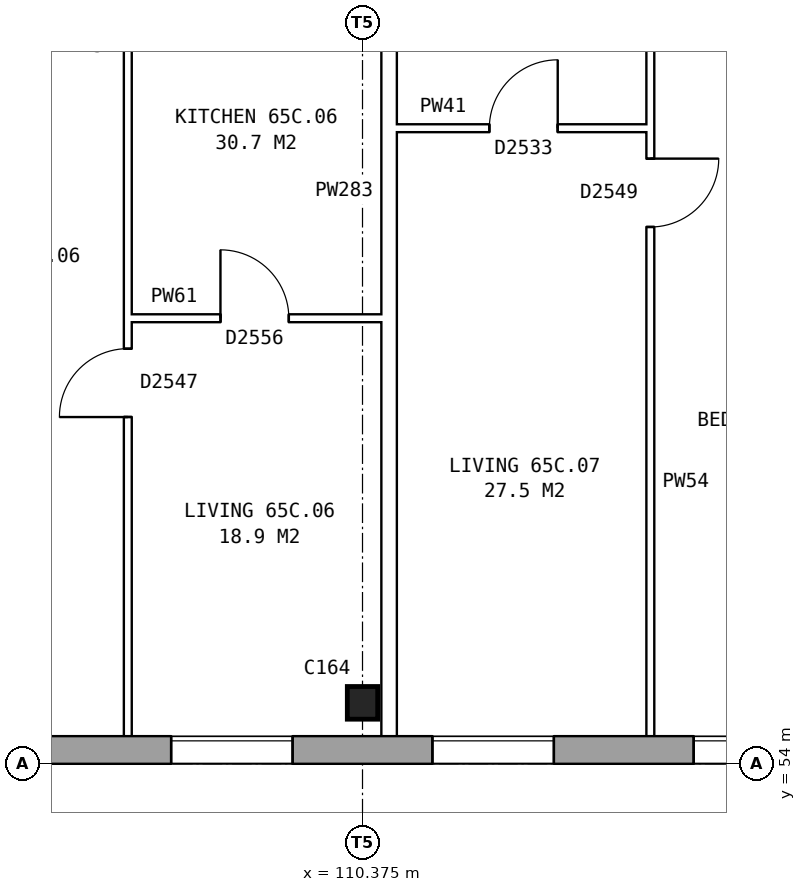
"""IFC4 building model, lengths in metres.
Left out: names, types, materials, properties, quantities, classifications, styles, units other than length and angle.
Written with IfcOpenShell. Run it as: python <this file> out.ifc"""

import sys

from ifc_helpers import new_model, si_unit, direction, frame, frame_2d, origin, origin_2d, place, context, subcontext, project, spatial, rectangle, i_section, extrude, element, fill, save


model = new_model("IFC4")
c1 = context("Model", 3, precision=1e-05, world=origin(), true_north=direction((0.0, 1.0)))
c2 = subcontext(c1, "Body", "Model", "MODEL_VIEW")
j1 = project(units=[si_unit("LENGTHUNIT", "METRE"), si_unit("PLANEANGLEUNIT", "RADIAN")], contexts=[c1])
p1 = place(None, origin())
s1 = spatial("IfcSite", under=j1, at=p1, CompositionType="ELEMENT")
p2 = place(p1, origin())
s2 = spatial("IfcBuilding", under=s1, at=p2, CompositionType="ELEMENT")
p3 = place(p2, frame((0.0, 0.0, 230.7)))
s3 = spatial("IfcBuildingStorey", under=s2, at=p3, CompositionType="ELEMENT", Elevation=230.7)
p4 = place(p3, frame((110.375, 54.8, 0.0), z_axis=(0.0, 0.0, 1.0), x_axis=(1.0, 0.0, 0.0)))
e1 = element("IfcColumn", 1, at=p4, inside=s3, PredefinedType="COLUMN", context=c2, shape_type="SweptSolid", body=[
    extrude(i_section(OverallWidth=0.4, OverallDepth=0.43, WebThickness=0.028, FlangeThickness=0.04, at=origin_2d()), origin(), (0.0, 0.0, 1.0), 2.85),
])
p5 = place(p3, frame((75.95, 54.18, 0.0), z_axis=(0.0, 0.0, 1.0), x_axis=(1.0, 0.0, 0.0)))
e2 = element("IfcWall", 2, at=p5, inside=s3, PredefinedType="STANDARD", context=c2, shape_type="SweptSolid", body=[
    extrude(rectangle(XDim=55.1, YDim=0.36, at=frame_2d((27.55, 0.0))), origin(), (0.0, 0.0, 1.0), 2.85),
])
p6 = place(p5, frame((0.969, 0.0, 0.8)))
e3 = element("IfcOpeningElement", 3, at=p6, cuts=e2, PredefinedType="OPENING", context=c2, shape_type="SweptSolid", body=[
    extrude(rectangle(XDim=1.6, YDim=1.8, at=frame_2d((0.8, 0.9))), frame((0.0, 0.19, 0.0), z_axis=(0.0, -1.0, 0.0), x_axis=(1.0, 0.0, 0.0)), (0.0, 0.0, 1.0), 0.38),
])
p7 = place(p5, frame((4.406, 0.0, 0.8)))
e4 = element("IfcOpeningElement", 4, at=p7, cuts=e2, PredefinedType="OPENING", context=c2, shape_type="SweptSolid", body=[
    extrude(rectangle(XDim=1.6, YDim=1.8, at=frame_2d((0.8, 0.9))), frame((0.0, 0.19, 0.0), z_axis=(0.0, -1.0, 0.0), x_axis=(1.0, 0.0, 0.0)), (0.0, 0.0, 1.0), 0.38),
])
p8 = place(p5, frame((7.844, 0.0, 0.8)))
e5 = element("IfcOpeningElement", 5, at=p8, cuts=e2, PredefinedType="OPENING", context=c2, shape_type="SweptSolid", body=[
    extrude(rectangle(XDim=1.6, YDim=1.8, at=frame_2d((0.8, 0.9))), frame((0.0, 0.19, 0.0), z_axis=(0.0, -1.0, 0.0), x_axis=(1.0, 0.0, 0.0)), (0.0, 0.0, 1.0), 0.38),
])
p9 = place(p5, frame((11.281, 0.0, 0.8)))
e6 = element("IfcOpeningElement", 6, at=p9, cuts=e2, PredefinedType="OPENING", context=c2, shape_type="SweptSolid", body=[
    extrude(rectangle(XDim=1.6, YDim=1.8, at=frame_2d((0.8, 0.9))), frame((0.0, 0.19, 0.0), z_axis=(0.0, -1.0, 0.0), x_axis=(1.0, 0.0, 0.0)), (0.0, 0.0, 1.0), 0.38),
])
p10 = place(p5, frame((14.719, 0.0, 0.8)))
e7 = element("IfcOpeningElement", 7, at=p10, cuts=e2, PredefinedType="OPENING", context=c2, shape_type="SweptSolid", body=[
    extrude(rectangle(XDim=1.6, YDim=1.8, at=frame_2d((0.8, 0.9))), frame((0.0, 0.19, 0.0), z_axis=(0.0, -1.0, 0.0), x_axis=(1.0, 0.0, 0.0)), (0.0, 0.0, 1.0), 0.38),
])
p11 = place(p5, frame((18.156, 0.0, 0.8)))
e8 = element("IfcOpeningElement", 8, at=p11, cuts=e2, PredefinedType="OPENING", context=c2, shape_type="SweptSolid", body=[
    extrude(rectangle(XDim=1.6, YDim=1.8, at=frame_2d((0.8, 0.9))), frame((0.0, 0.19, 0.0), z_axis=(0.0, -1.0, 0.0), x_axis=(1.0, 0.0, 0.0)), (0.0, 0.0, 1.0), 0.38),
])
p12 = place(p5, frame((21.594, 0.0, 0.8)))
e9 = element("IfcOpeningElement", 9, at=p12, cuts=e2, PredefinedType="OPENING", context=c2, shape_type="SweptSolid", body=[
    extrude(rectangle(XDim=1.6, YDim=1.8, at=frame_2d((0.8, 0.9))), frame((0.0, 0.19, 0.0), z_axis=(0.0, -1.0, 0.0), x_axis=(1.0, 0.0, 0.0)), (0.0, 0.0, 1.0), 0.38),
])
p13 = place(p5, frame((25.031, 0.0, 0.8)))
e10 = element("IfcOpeningElement", 10, at=p13, cuts=e2, PredefinedType="OPENING", context=c2, shape_type="SweptSolid", body=[
    extrude(rectangle(XDim=1.6, YDim=1.8, at=frame_2d((0.8, 0.9))), frame((0.0, 0.19, 0.0), z_axis=(0.0, -1.0, 0.0), x_axis=(1.0, 0.0, 0.0)), (0.0, 0.0, 1.0), 0.38),
])
p14 = place(p5, frame((28.469, 0.0, 0.8)))
e11 = element("IfcOpeningElement", 11, at=p14, cuts=e2, PredefinedType="OPENING", context=c2, shape_type="SweptSolid", body=[
    extrude(rectangle(XDim=1.6, YDim=1.8, at=frame_2d((0.8, 0.9))), frame((0.0, 0.19, 0.0), z_axis=(0.0, -1.0, 0.0), x_axis=(1.0, 0.0, 0.0)), (0.0, 0.0, 1.0), 0.38),
])
p15 = place(p5, frame((31.906, 0.0, 0.8)))
e12 = element("IfcOpeningElement", 12, at=p15, cuts=e2, PredefinedType="OPENING", context=c2, shape_type="SweptSolid", body=[
    extrude(rectangle(XDim=1.6, YDim=1.8, at=frame_2d((0.8, 0.9))), frame((0.0, 0.19, 0.0), z_axis=(0.0, -1.0, 0.0), x_axis=(1.0, 0.0, 0.0)), (0.0, 0.0, 1.0), 0.38),
])
p16 = place(p5, frame((35.344, 0.0, 0.8)))
e13 = element("IfcOpeningElement", 13, at=p16, cuts=e2, PredefinedType="OPENING", context=c2, shape_type="SweptSolid", body=[
    extrude(rectangle(XDim=1.6, YDim=1.8, at=frame_2d((0.8, 0.9))), frame((0.0, 0.19, 0.0), z_axis=(0.0, -1.0, 0.0), x_axis=(1.0, 0.0, 0.0)), (0.0, 0.0, 1.0), 0.38),
])
p17 = place(p5, frame((38.781, 0.0, 0.8)))
e14 = element("IfcOpeningElement", 14, at=p17, cuts=e2, PredefinedType="OPENING", context=c2, shape_type="SweptSolid", body=[
    extrude(rectangle(XDim=1.6, YDim=1.8, at=frame_2d((0.8, 0.9))), frame((0.0, 0.19, 0.0), z_axis=(0.0, -1.0, 0.0), x_axis=(1.0, 0.0, 0.0)), (0.0, 0.0, 1.0), 0.38),
])
p18 = place(p5, frame((42.219, 0.0, 0.8)))
e15 = element("IfcOpeningElement", 15, at=p18, cuts=e2, PredefinedType="OPENING", context=c2, shape_type="SweptSolid", body=[
    extrude(rectangle(XDim=1.6, YDim=1.8, at=frame_2d((0.8, 0.9))), frame((0.0, 0.19, 0.0), z_axis=(0.0, -1.0, 0.0), x_axis=(1.0, 0.0, 0.0)), (0.0, 0.0, 1.0), 0.38),
])
p19 = place(p5, frame((45.656, 0.0, 0.8)))
e16 = element("IfcOpeningElement", 16, at=p19, cuts=e2, PredefinedType="OPENING", context=c2, shape_type="SweptSolid", body=[
    extrude(rectangle(XDim=1.6, YDim=1.8, at=frame_2d((0.8, 0.9))), frame((0.0, 0.19, 0.0), z_axis=(0.0, -1.0, 0.0), x_axis=(1.0, 0.0, 0.0)), (0.0, 0.0, 1.0), 0.38),
])
p20 = place(p5, frame((49.094, 0.0, 0.8)))
e17 = element("IfcOpeningElement", 17, at=p20, cuts=e2, PredefinedType="OPENING", context=c2, shape_type="SweptSolid", body=[
    extrude(rectangle(XDim=1.6, YDim=1.8, at=frame_2d((0.8, 0.9))), frame((0.0, 0.19, 0.0), z_axis=(0.0, -1.0, 0.0), x_axis=(1.0, 0.0, 0.0)), (0.0, 0.0, 1.0), 0.38),
])
p21 = place(p5, frame((52.531, 0.0, 0.8)))
e18 = element("IfcOpeningElement", 18, at=p21, cuts=e2, PredefinedType="OPENING", context=c2, shape_type="SweptSolid", body=[
    extrude(rectangle(XDim=1.6, YDim=1.8, at=frame_2d((0.8, 0.9))), frame((0.0, 0.19, 0.0), z_axis=(0.0, -1.0, 0.0), x_axis=(1.0, 0.0, 0.0)), (0.0, 0.0, 1.0), 0.38),
])
p22 = place(p3, frame((107.287, 59.86, 0.0), z_axis=(0.0, 0.0, 1.0), x_axis=(1.0, 0.0, 0.0)))
e19 = element("IfcWall", 19, at=p22, inside=s3, PredefinedType="PARTITIONING", context=c2, shape_type="SweptSolid", body=[
    extrude(rectangle(XDim=3.338, YDim=0.1, at=frame_2d((1.669, 0.0))), origin(), (0.0, 0.0, 1.0), 2.85),
])
p23 = place(p22, frame((1.219, 0.0, 0.0)))
e20 = element("IfcOpeningElement", 20, at=p23, cuts=e19, PredefinedType="OPENING", context=c2, shape_type="SweptSolid", body=[
    extrude(rectangle(XDim=0.9, YDim=2.1, at=frame_2d((0.45, 1.05))), frame((0.0, 0.06, 0.0), z_axis=(0.0, -1.0, 0.0), x_axis=(1.0, 0.0, 0.0)), (0.0, 0.0, 1.0), 0.12),
])
p24 = place(p3, frame((110.825, 62.36, 0.0), z_axis=(0.0, 0.0, 1.0), x_axis=(1.0, 0.0, 0.0)))
e21 = element("IfcWall", 21, at=p24, inside=s3, PredefinedType="PARTITIONING", context=c2, shape_type="SweptSolid", body=[
    extrude(rectangle(XDim=3.337, YDim=0.1, at=frame_2d((1.668, 0.0))), origin(), (0.0, 0.0, 1.0), 2.85),
])
p25 = place(p24, frame((1.219, 0.0, 0.0)))
e22 = element("IfcOpeningElement", 22, at=p25, cuts=e21, PredefinedType="OPENING", context=c2, shape_type="SweptSolid", body=[
    extrude(rectangle(XDim=0.9, YDim=2.1, at=frame_2d((0.45, 1.05))), frame((0.0, 0.06, 0.0), z_axis=(0.0, -1.0, 0.0), x_axis=(1.0, 0.0, 0.0)), (0.0, 0.0, 1.0), 0.12),
])
p26 = place(p3, frame((107.287, 54.36, 0.0), z_axis=(0.0, 0.0, 1.0), x_axis=(0.0, 1.0, 0.0)))
e23 = element("IfcWall", 23, at=p26, inside=s3, PredefinedType="PARTITIONING", context=c2, shape_type="SweptSolid", body=[
    extrude(rectangle(XDim=14.34, YDim=0.1, at=frame_2d((7.17, 0.0))), origin(), (0.0, 0.0, 1.0), 2.85),
])
p27 = place(p26, frame((4.2, 0.0, 0.0)))
e24 = element("IfcOpeningElement", 24, at=p27, cuts=e23, PredefinedType="OPENING", context=c2, shape_type="SweptSolid", body=[
    extrude(rectangle(XDim=0.9, YDim=2.1, at=frame_2d((0.45, 1.05))), frame((0.0, 0.06, 0.0), z_axis=(0.0, -1.0, 0.0), x_axis=(1.0, 0.0, 0.0)), (0.0, 0.0, 1.0), 0.12),
])
p28 = place(p26, frame((13.04, 0.0, 0.0)))
e25 = element("IfcOpeningElement", 25, at=p28, cuts=e23, PredefinedType="OPENING", context=c2, shape_type="SweptSolid", body=[
    extrude(rectangle(XDim=0.9, YDim=2.1, at=frame_2d((0.45, 1.05))), frame((0.0, 0.06, 0.0), z_axis=(0.0, -1.0, 0.0), x_axis=(1.0, 0.0, 0.0)), (0.0, 0.0, 1.0), 0.12),
])
p29 = place(p3, frame((110.725, 54.36, 0.0), z_axis=(0.0, 0.0, 1.0), x_axis=(0.0, 1.0, 0.0)))
e26 = element("IfcWall", 26, at=p29, inside=s3, PredefinedType="PARTITIONING", context=c2, shape_type="SweptSolid", body=[
    extrude(rectangle(XDim=14.34, YDim=0.2, at=frame_2d((7.17, 0.0))), origin(), (0.0, 0.0, 1.0), 2.85),
])
p30 = place(p3, frame((114.162, 54.36, 0.0), z_axis=(0.0, 0.0, 1.0), x_axis=(0.0, 1.0, 0.0)))
e27 = element("IfcWall", 27, at=p30, inside=s3, PredefinedType="PARTITIONING", context=c2, shape_type="SweptSolid", body=[
    extrude(rectangle(XDim=14.34, YDim=0.1, at=frame_2d((7.17, 0.0))), origin(), (0.0, 0.0, 1.0), 2.85),
])
p31 = place(p30, frame((6.7, 0.0, 0.0)))
e28 = element("IfcOpeningElement", 28, at=p31, cuts=e27, PredefinedType="OPENING", context=c2, shape_type="SweptSolid", body=[
    extrude(rectangle(XDim=0.9, YDim=2.1, at=frame_2d((0.45, 1.05))), frame((0.0, 0.06, 0.0), z_axis=(0.0, -1.0, 0.0), x_axis=(1.0, 0.0, 0.0)), (0.0, 0.0, 1.0), 0.12),
])
p32 = place(p30, frame((13.04, 0.0, 0.0)))
e29 = element("IfcOpeningElement", 29, at=p32, cuts=e27, PredefinedType="OPENING", context=c2, shape_type="SweptSolid", body=[
    extrude(rectangle(XDim=0.9, YDim=2.1, at=frame_2d((0.45, 1.05))), frame((0.0, 0.06, 0.0), z_axis=(0.0, -1.0, 0.0), x_axis=(1.0, 0.0, 0.0)), (0.0, 0.0, 1.0), 0.12),
])
p33 = place(p15, origin())
e30 = element("IfcWindow", 30, at=p33, inside=s3, PartitioningType="SINGLE_PANEL", PredefinedType="WINDOW", context=c2, shape_type="SweptSolid", body=[
    extrude(rectangle(XDim=1.6, YDim=1.8, at=frame_2d((0.8, 0.9))), frame((0.0, 0.15, 0.0), z_axis=(0.0, -1.0, 0.0), x_axis=(1.0, 0.0, 0.0)), (0.0, 0.0, 1.0), 0.06),
])
fill(e12, e30)
p34 = place(p16, origin())
e31 = element("IfcWindow", 31, at=p34, inside=s3, PartitioningType="SINGLE_PANEL", PredefinedType="WINDOW", context=c2, shape_type="SweptSolid", body=[
    extrude(rectangle(XDim=1.6, YDim=1.8, at=frame_2d((0.8, 0.9))), frame((0.0, 0.15, 0.0), z_axis=(0.0, -1.0, 0.0), x_axis=(1.0, 0.0, 0.0)), (0.0, 0.0, 1.0), 0.06),
])
fill(e13, e31)
p35 = place(p17, origin())
e32 = element("IfcWindow", 32, at=p35, inside=s3, PartitioningType="SINGLE_PANEL", PredefinedType="WINDOW", context=c2, shape_type="SweptSolid", body=[
    extrude(rectangle(XDim=1.6, YDim=1.8, at=frame_2d((0.8, 0.9))), frame((0.0, 0.15, 0.0), z_axis=(0.0, -1.0, 0.0), x_axis=(1.0, 0.0, 0.0)), (0.0, 0.0, 1.0), 0.06),
])
fill(e14, e32)
p36 = place(p27, origin())
e33 = element("IfcDoor", 33, at=p36, inside=s3, OperationType="SINGLE_SWING_LEFT", PredefinedType="DOOR", context=c2, shape_type="SweptSolid", body=[
    extrude(rectangle(XDim=0.9, YDim=2.1, at=frame_2d((0.45, 1.05))), frame((0.0, 0.025, 0.0), z_axis=(0.0, -1.0, 0.0), x_axis=(1.0, 0.0, 0.0)), (0.0, 0.0, 1.0), 0.05),
])
fill(e24, e33)
p37 = place(p23, origin())
e34 = element("IfcDoor", 34, at=p37, inside=s3, OperationType="SINGLE_SWING_LEFT", PredefinedType="DOOR", context=c2, shape_type="SweptSolid", body=[
    extrude(rectangle(XDim=0.9, YDim=2.1, at=frame_2d((0.45, 1.05))), frame((0.0, 0.025, 0.0), z_axis=(0.0, -1.0, 0.0), x_axis=(1.0, 0.0, 0.0)), (0.0, 0.0, 1.0), 0.05),
])
fill(e20, e34)
p38 = place(p31, frame((0.9, 0.0, 0.0), z_axis=(0.0, 0.0, 1.0), x_axis=(-1.0, 0.0, 0.0)))
e35 = element("IfcDoor", 35, at=p38, inside=s3, OperationType="SINGLE_SWING_LEFT", PredefinedType="DOOR", context=c2, shape_type="SweptSolid", body=[
    extrude(rectangle(XDim=0.9, YDim=2.1, at=frame_2d((0.45, 1.05))), frame((0.0, 0.025, 0.0), z_axis=(0.0, -1.0, 0.0), x_axis=(1.0, 0.0, 0.0)), (0.0, 0.0, 1.0), 0.05),
])
fill(e28, e35)
p39 = place(p25, origin())
e36 = element("IfcDoor", 36, at=p39, inside=s3, OperationType="SINGLE_SWING_RIGHT", PredefinedType="DOOR", context=c2, shape_type="SweptSolid", body=[
    extrude(rectangle(XDim=0.9, YDim=2.1, at=frame_2d((0.45, 1.05))), frame((0.0, 0.025, 0.0), z_axis=(0.0, -1.0, 0.0), x_axis=(1.0, 0.0, 0.0)), (0.0, 0.0, 1.0), 0.05),
])
fill(e22, e36)
save(model, sys.argv[1])
